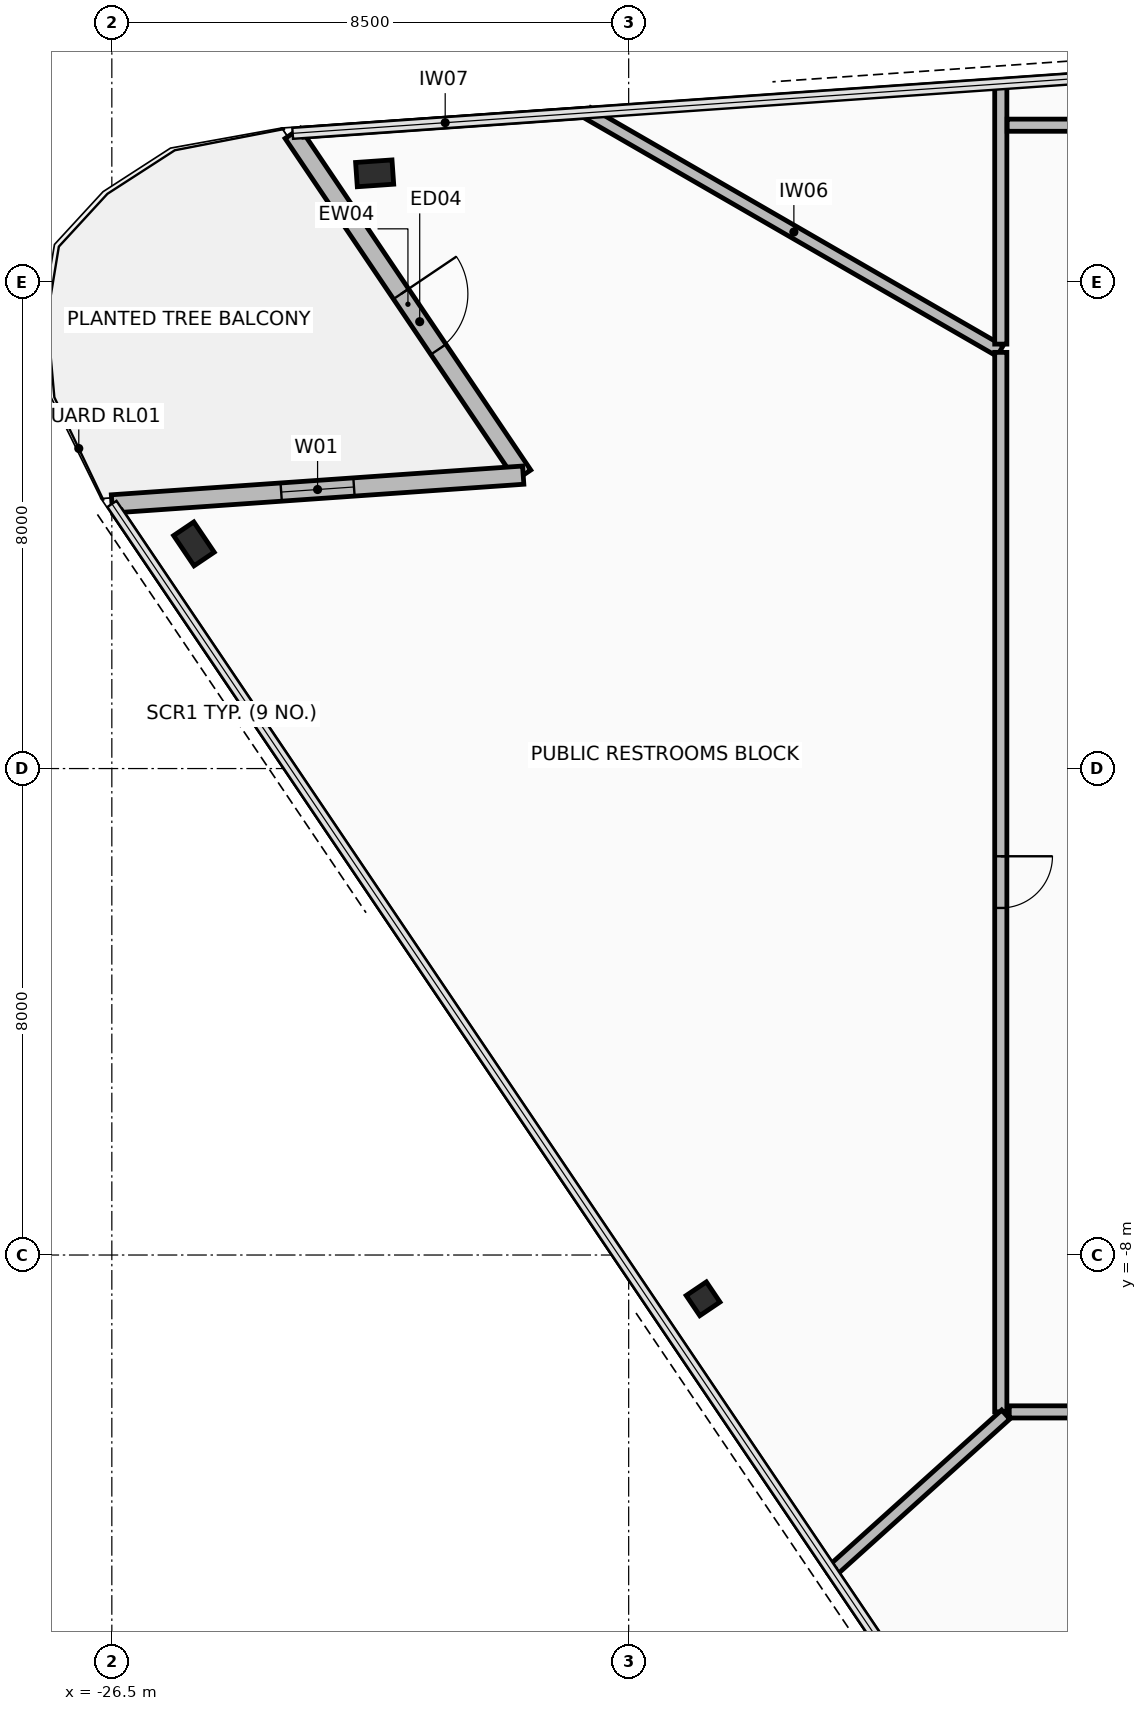
"""IFC4 building model, lengths in metres.
Left out: names, types, materials, properties, quantities, classifications, styles, units other than length and angle.
Written with IfcOpenShell. Run it as: python <this file> out.ifc"""

import sys

from ifc_helpers import new_model, si_unit, direction, frame, frame_2d, origin, origin_2d, place, context, subcontext, project, spatial, rectangle, hollow_rectangle, extrude, element, fill, save


model = new_model("IFC4")
c1 = context("Model", 3, precision=1e-05, world=origin(), true_north=direction((0.0, 1.0)))
c2 = subcontext(c1, "Body", "Model", "MODEL_VIEW")
j1 = project(units=[si_unit("LENGTHUNIT", "METRE"), si_unit("PLANEANGLEUNIT", "RADIAN")], contexts=[c1])
p1 = place(None, origin())
s1 = spatial("IfcSite", under=j1, at=p1, CompositionType="ELEMENT")
p2 = place(p1, origin())
s2 = spatial("IfcBuilding", under=s1, at=p2, CompositionType="ELEMENT")
p3 = place(p2, frame((0.0, 0.0, 271.4)))
s3 = spatial("IfcBuildingStorey", under=s2, at=p3, CompositionType="ELEMENT", Elevation=271.4)
p4 = place(p3, frame((-25.15, 3.695, 0.0), z_axis=(0.0, 0.0, 1.0), x_axis=(-0.559192903471, 0.829037572555, 0.0)))
e1 = element("IfcColumn", 1, at=p4, inside=s3, PredefinedType="COLUMN", context=c2, shape_type="SweptSolid", body=[
    extrude(hollow_rectangle(XDim=0.4, YDim=0.6, WallThickness=0.03, at=origin_2d()), origin(), (0.0, 0.0, 1.0), 3.6),
])
p5 = place(p3, frame((-16.776, -8.72, 0.0), z_axis=(0.0, 0.0, 1.0), x_axis=(-0.559192903471, 0.829037572555, 0.0)))
e2 = element("IfcColumn", 2, at=p5, inside=s3, PredefinedType="COLUMN", context=c2, shape_type="SweptSolid", body=[
    extrude(hollow_rectangle(XDim=0.4, YDim=0.4, WallThickness=0.025, at=origin_2d()), origin(), (0.0, 0.0, 1.0), 3.6),
])
p6 = place(p3, frame((-22.177, 9.789, 0.0), z_axis=(0.0, 0.0, 1.0), x_axis=(0.99756392851, 0.069758214822, 0.0)))
e3 = element("IfcColumn", 3, at=p6, inside=s3, PredefinedType="COLUMN", context=c2, shape_type="SweptSolid", body=[
    extrude(hollow_rectangle(XDim=0.4, YDim=0.6, WallThickness=0.03, at=origin_2d()), origin(), (0.0, 0.0, 1.0), 3.6),
])
p7 = place(p3, frame((-23.526, 10.446, 0.0), z_axis=(0.0, 0.0, 1.0), x_axis=(0.559187716425, -0.829041071238, 0.0)))
e4 = element("IfcWall", 4, at=p7, inside=s3, PredefinedType="STANDARD", context=c2, shape_type="SweptSolid", body=[
    extrude(rectangle(XDim=6.78, YDim=0.3, at=frame_2d((3.39, 0.0))), origin(), (0.0, 0.0, 1.0), 2.765),
])
p8 = place(p7, frame((3.186, 0.0, 0.0)))
e5 = element("IfcOpeningElement", 5, at=p8, cuts=e4, PredefinedType="OPENING", context=c2, shape_type="SweptSolid", body=[
    extrude(rectangle(XDim=1.1, YDim=2.2, at=frame_2d((0.55, 1.1))), frame((0.0, 0.16, 0.0), z_axis=(0.0, -1.0, 0.0), x_axis=(1.0, 0.0, 0.0)), (0.0, 0.0, 1.0), 0.32),
])
p9 = place(p3, frame((-19.735, 4.825, 0.0), z_axis=(0.0, 0.0, 1.0), x_axis=(-0.997564507468, -0.06974993506, 0.0)))
e6 = element("IfcWall", 6, at=p9, inside=s3, PredefinedType="STANDARD", context=c2, shape_type="SweptSolid", body=[
    extrude(rectangle(XDim=6.78, YDim=0.3, at=frame_2d((3.39, 0.0))), origin(), (0.0, 0.0, 1.0), 2.765),
])
p10 = place(p9, frame((2.79, 0.0, 0.485)))
e7 = element("IfcOpeningElement", 7, at=p10, cuts=e6, PredefinedType="OPENING", context=c2, shape_type="SweptSolid", body=[
    extrude(rectangle(XDim=1.2, YDim=2.1, at=frame_2d((0.6, 1.05))), frame((0.0, 0.16, 0.0), z_axis=(0.0, -1.0, 0.0), x_axis=(1.0, 0.0, 0.0)), (0.0, 0.0, 1.0), 0.32),
])
p11 = place(p3, frame((-23.347, 10.458, 0.0), z_axis=(0.0, 0.0, 1.0), x_axis=(0.997566316113, 0.069724062962, 0.0)))
e8 = element("IfcWall", 8, at=p11, inside=s3, PredefinedType="PARTITIONING", context=c2, shape_type="SweptSolid", body=[
    extrude(rectangle(XDim=4.671, YDim=0.15, at=frame_2d((2.335, 0.0))), origin(), (0.0, 0.0, 1.0), 3.42),
])
p12 = place(p3, frame((-18.673, 10.781, 0.0), z_axis=(0.0, 0.0, 1.0), x_axis=(0.866029810455, -0.499992367345, 0.0)))
e9 = element("IfcWall", 9, at=p12, inside=s3, PredefinedType="PARTITIONING", context=c2, shape_type="SweptSolid", body=[
    extrude(rectangle(XDim=7.83, YDim=0.2, at=frame_2d((3.915, 0.0))), origin(), (0.0, 0.0, 1.0), 2.765),
])
p13 = place(p3, frame((-11.88, 6.844, 0.0), z_axis=(0.0, 0.0, 1.0), x_axis=(0.0, -1.0, 0.0)))
e10 = element("IfcWall", 10, at=p13, inside=s3, PredefinedType="PARTITIONING", context=c2, shape_type="SweptSolid", body=[
    extrude(rectangle(XDim=17.424, YDim=0.2, at=frame_2d((8.712, 0.0))), origin(), (0.0, 0.0, 1.0), 2.915),
])
p14 = place(p13, frame((8.287, 0.0, 0.0)))
e11 = element("IfcOpeningElement", 11, at=p14, cuts=e10, PredefinedType="OPENING", context=c2, shape_type="SweptSolid", body=[
    extrude(rectangle(XDim=0.85, YDim=2.1, at=frame_2d((0.425, 1.05))), frame((0.0, 0.11, 0.0), z_axis=(0.0, -1.0, 0.0), x_axis=(1.0, 0.0, 0.0)), (0.0, 0.0, 1.0), 0.22),
])
p15 = place(p3, frame((-11.799, -10.624, 0.0), z_axis=(0.0, 0.0, 1.0), x_axis=(-0.743135262532, -0.669141226933, 0.0)))
e12 = element("IfcWall", 12, at=p15, inside=s3, PredefinedType="PARTITIONING", context=c2, shape_type="SweptSolid", body=[
    extrude(rectangle(XDim=3.821, YDim=0.2, at=frame_2d((1.91, 0.0))), origin(), (0.0, 0.0, 1.0), 2.765),
])
p16 = place(p3, frame((-14.676, -13.176, 0.0), z_axis=(0.0, 0.0, 1.0), x_axis=(-0.559188394736, 0.829040613717, 0.0)))
e13 = element("IfcWall", 13, at=p16, inside=s3, PredefinedType="PARTITIONING", context=c2, shape_type="SweptSolid", body=[
    extrude(rectangle(XDim=20.963, YDim=0.15, at=frame_2d((10.482, 0.0))), origin(), (0.0, 0.0, 1.0), 3.42),
])
p17 = place(p3, frame((-0.024, -34.897, 0.0), z_axis=(0.0, 0.0, 1.0), x_axis=(-0.559190617233, 0.829039114637, 0.0)))
e14 = element("IfcWall", 14, at=p17, inside=s3, PredefinedType="PARTITIONING", context=c2, shape_type="SweptSolid", body=[
    extrude(rectangle(XDim=26.15, YDim=0.15, at=frame_2d((13.075, 0.0))), origin(), (0.0, 0.0, 1.0), 3.42),
])
p18 = place(p3, frame((-11.741, -10.58, 0.0), z_axis=(0.0, 0.0, 1.0), x_axis=(1.0, 0.0, 0.0)))
e15 = element("IfcWall", 15, at=p18, inside=s3, PredefinedType="PARTITIONING", context=c2, shape_type="SweptSolid", body=[
    extrude(rectangle(XDim=16.435, YDim=0.2, at=frame_2d((8.218, 0.0))), origin(), (0.0, 0.0, 1.0), 2.915),
])
p19 = place(p18, frame((7.793, 0.0, 0.0)))
e16 = element("IfcOpeningElement", 16, at=p19, cuts=e15, PredefinedType="OPENING", context=c2, shape_type="SweptSolid", body=[
    extrude(rectangle(XDim=0.85, YDim=2.1, at=frame_2d((0.425, 1.05))), frame((0.0, 0.11, 0.0), z_axis=(0.0, -1.0, 0.0), x_axis=(1.0, 0.0, 0.0)), (0.0, 0.0, 1.0), 0.22),
])
p20 = place(p3, frame((-11.88, 11.26, 0.0), z_axis=(0.0, 0.0, 1.0), x_axis=(0.0, -1.0, 0.0)))
e17 = element("IfcWall", 17, at=p20, inside=s3, PredefinedType="PARTITIONING", context=c2, shape_type="SweptSolid", body=[
    extrude(rectangle(XDim=4.281, YDim=0.2, at=frame_2d((2.14, 0.0))), origin(), (0.0, 0.0, 1.0), 2.765),
])
p21 = place(p3, frame((2.229, 10.58, 0.0), z_axis=(0.0, 0.0, 1.0), x_axis=(-1.0, 0.0, 0.0)))
e18 = element("IfcWall", 18, at=p21, inside=s3, PredefinedType="PARTITIONING", context=c2, shape_type="SweptSolid", body=[
    extrude(rectangle(XDim=14.003, YDim=0.2, at=frame_2d((7.002, 0.0))), origin(), (0.0, 0.0, 1.0), 2.765),
])
p22 = place(p21, frame((6.502, 0.0, 0.0)))
e19 = element("IfcOpeningElement", 19, at=p22, cuts=e18, PredefinedType="OPENING", context=c2, shape_type="SweptSolid", body=[
    extrude(rectangle(XDim=1.0, YDim=2.15, at=frame_2d((0.5, 1.075))), frame((0.0, 0.11, 0.0), z_axis=(0.0, -1.0, 0.0), x_axis=(1.0, 0.0, 0.0)), (0.0, 0.0, 1.0), 0.22),
])
p23 = place(p8, origin())
e20 = element("IfcDoor", 20, at=p23, inside=s3, OperationType="SINGLE_SWING_LEFT", PredefinedType="DOOR", context=c2, shape_type="SweptSolid", body=[
    extrude(rectangle(XDim=1.1, YDim=2.2, at=frame_2d((0.55, 1.1))), frame((0.0, 0.025, 0.0), z_axis=(0.0, -1.0, 0.0), x_axis=(1.0, 0.0, 0.0)), (0.0, 0.0, 1.0), 0.05),
])
fill(e5, e20)
p24 = place(p10, origin())
e21 = element("IfcWindow", 21, at=p24, inside=s3, PartitioningType="SINGLE_PANEL", PredefinedType="WINDOW", context=c2, shape_type="SweptSolid", body=[
    extrude(rectangle(XDim=1.2, YDim=2.1, at=frame_2d((0.6, 1.05))), frame((0.0, 0.03, 0.0), z_axis=(0.0, -1.0, 0.0), x_axis=(1.0, 0.0, 0.0)), (0.0, 0.0, 1.0), 0.06),
])
fill(e7, e21)
p25 = place(p14, origin())
e22 = element("IfcDoor", 22, at=p25, inside=s3, OperationType="SINGLE_SWING_RIGHT", PredefinedType="DOOR", context=c2, shape_type="SweptSolid", body=[
    extrude(rectangle(XDim=0.85, YDim=2.1, at=frame_2d((0.425, 1.05))), frame((0.0, 0.025, 0.0), z_axis=(0.0, -1.0, 0.0), x_axis=(1.0, 0.0, 0.0)), (0.0, 0.0, 1.0), 0.05),
])
fill(e11, e22)
save(model, sys.argv[1])
